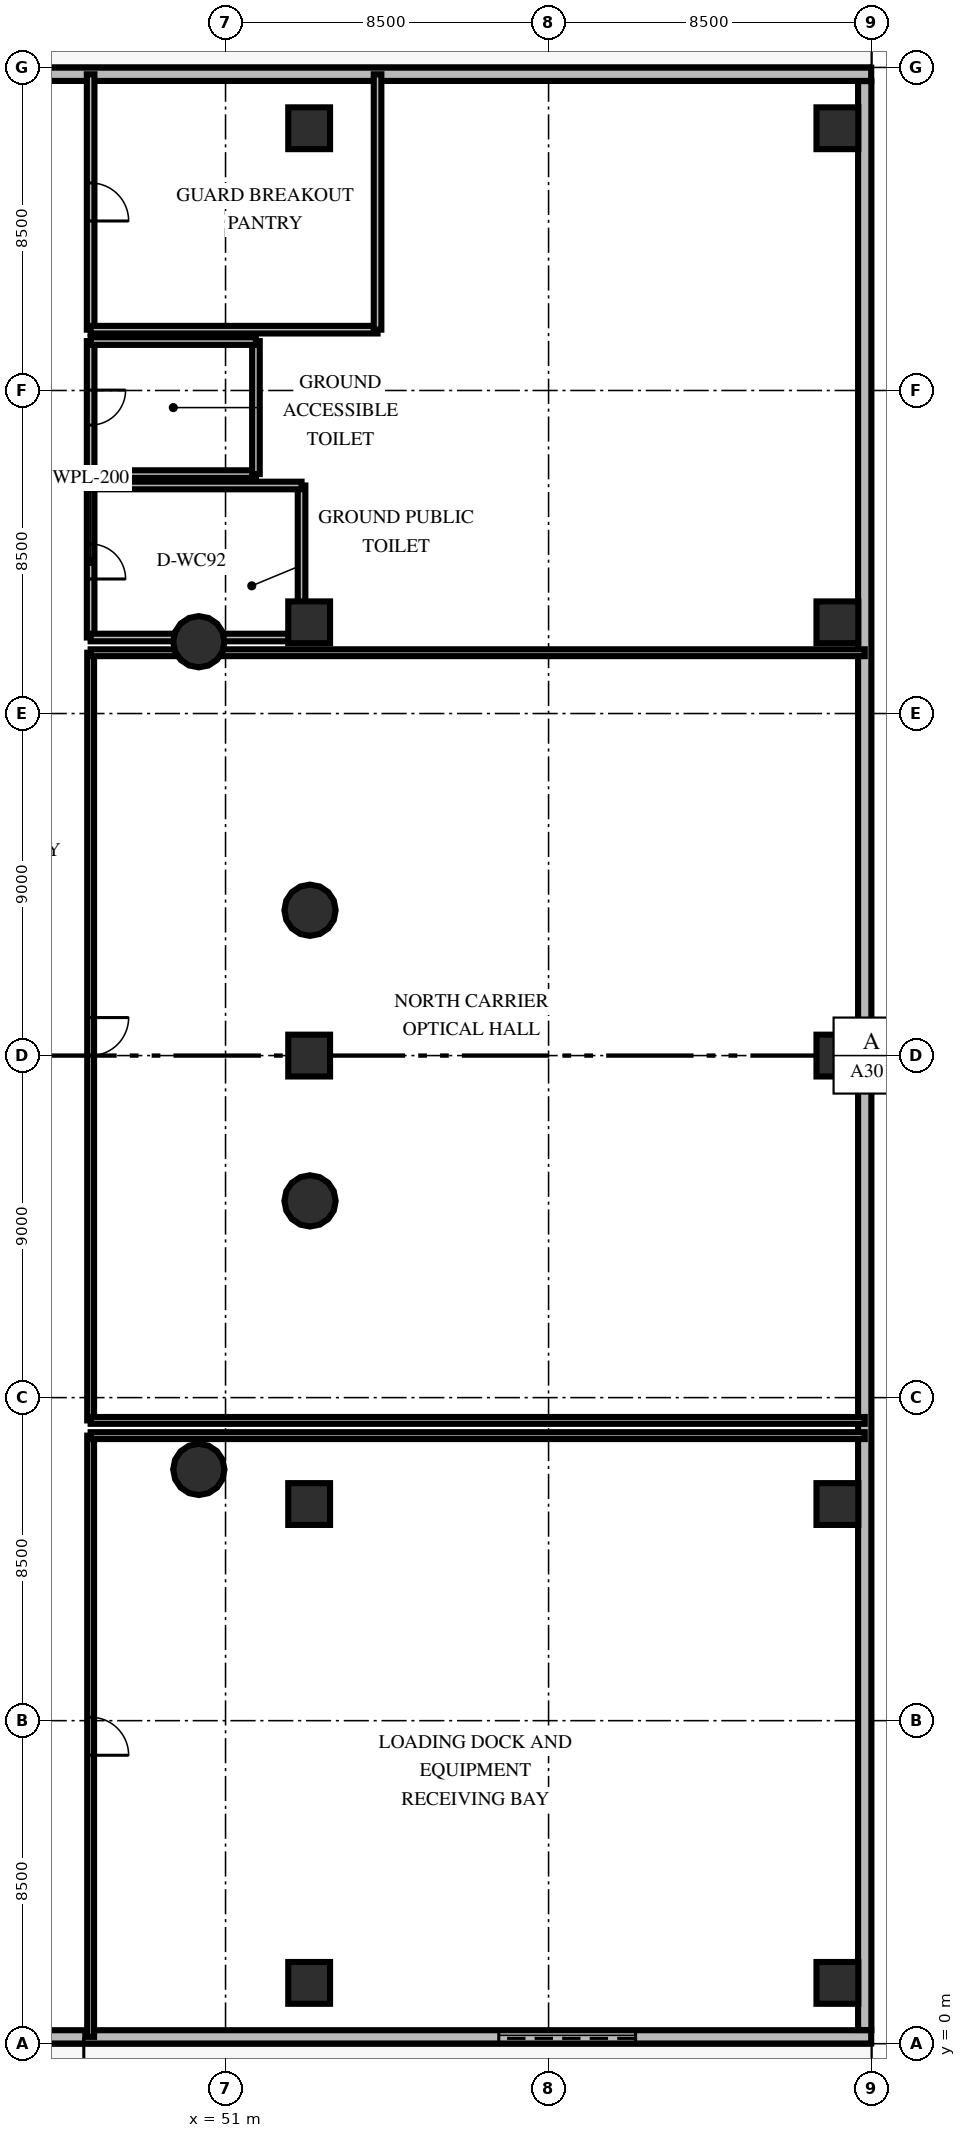
"""IFC4 building model, lengths in metres.
Left out: names, types, materials, properties, quantities, classifications, styles, units other than length and angle.
Written with IfcOpenShell. Run it as: python <this file> out.ifc"""

import sys

from ifc_helpers import new_model, si_unit, direction, frame, frame_2d, origin, origin_2d, place, context, subcontext, project, spatial, rectangle, circle, extrude, element, fill, save


model = new_model("IFC4")
c1 = context("Model", 3, precision=1e-05, world=origin(), true_north=direction((0.0, 1.0)))
c2 = subcontext(c1, "Body", "Model", "MODEL_VIEW")
j1 = project(units=[si_unit("LENGTHUNIT", "METRE"), si_unit("PLANEANGLEUNIT", "RADIAN")], contexts=[c1])
p1 = place(None, origin())
s1 = spatial("IfcSite", under=j1, at=p1, CompositionType="ELEMENT")
p2 = place(p1, origin())
s2 = spatial("IfcBuilding", under=s1, at=p2, CompositionType="ELEMENT")
p3 = place(p2, origin())
s3 = spatial("IfcBuildingStorey", under=s2, at=p3, CompositionType="ELEMENT", Elevation=0.0)
for number, where, z_axis, x_axis in (
    (1, (53.2, 1.6, 0.0), (0.0, 0.0, 1.0), (1.0, 0.0, 0.0)),
    (2, (53.2, 14.2, 0.0), (0.0, 0.0, 1.0), (1.0, 0.0, 0.0)),
    (3, (53.2, 26.0, 0.0), (0.0, 0.0, 1.0), (1.0, 0.0, 0.0)),
    (4, (53.2, 37.4, 0.0), (0.0, 0.0, 1.0), (1.0, 0.0, 0.0)),
    (5, (53.2, 50.4, 0.0), (0.0, 0.0, 1.0), (1.0, 0.0, 0.0)),
    (6, (67.1, 1.6, 0.0), (0.0, 0.0, 1.0), (1.0, 0.0, 0.0)),
    (7, (67.1, 14.2, 0.0), (0.0, 0.0, 1.0), (1.0, 0.0, 0.0)),
    (8, (67.1, 26.0, 0.0), (0.0, 0.0, 1.0), (1.0, 0.0, 0.0)),
    (9, (67.1, 37.4, 0.0), (0.0, 0.0, 1.0), (1.0, 0.0, 0.0)),
    (10, (67.1, 50.4, 0.0), (0.0, 0.0, 1.0), (1.0, 0.0, 0.0)),
):
    element("IfcColumn", number, at=place(p3, frame(where, z_axis=z_axis, x_axis=x_axis)), inside=s3, PredefinedType="COLUMN", context=c2, shape_type="SweptSolid", body=[
        extrude(rectangle(XDim=1.1, YDim=1.1, at=origin_2d()), origin(), (0.0, 0.0, 1.0), 5.4),
    ])
for number, where, z_axis, x_axis in (
    (11, (53.223, 29.824, 0.0), (0.0, 0.0, 1.0), (1.0, 0.0, 0.0)),
    (12, (50.297, 36.889, 0.0), (0.0, 0.0, 1.0), (1.0, 0.0, 0.0)),
    (13, (50.297, 15.111, 0.0), (0.0, 0.0, 1.0), (1.0, 0.0, 0.0)),
    (14, (53.223, 22.176, 0.0), (0.0, 0.0, 1.0), (1.0, 0.0, 0.0)),
):
    element("IfcColumn", number, at=place(p3, frame(where, z_axis=z_axis, x_axis=x_axis)), inside=s3, PredefinedType="COLUMN", context=c2, shape_type="SweptSolid", body=[
        extrude(circle(Radius=0.675, at=origin_2d()), origin(), (0.0, 0.0, 1.0), 5.4),
    ])
p4 = place(p3, frame((67.99, 0.18, 0.0), z_axis=(0.0, 0.0, 1.0), x_axis=(-1.0, 0.0, 0.0)))
e15 = element("IfcWall", 15, at=p4, inside=s3, PredefinedType="SOLIDWALL", context=c2, shape_type="SweptSolid", body=[
    extrude(rectangle(XDim=25.37, YDim=0.35, at=frame_2d((12.685, 0.0))), origin(), (0.0, 0.0, 1.0), 4.36),
])
p5 = place(p4, frame((20.72, 0.0, 0.0)))
e16 = element("IfcOpeningElement", 16, at=p5, cuts=e15, PredefinedType="OPENING", context=c2, shape_type="SweptSolid", body=[
    extrude(rectangle(XDim=2.1, YDim=2.35, at=frame_2d((1.05, 1.175))), frame((0.0, 0.185, 0.0), z_axis=(0.0, -1.0, 0.0), x_axis=(1.0, 0.0, 0.0)), (0.0, 0.0, 1.0), 0.37),
])
p6 = place(p4, frame((6.2, 0.0, 0.0)))
e17 = element("IfcOpeningElement", 17, at=p6, cuts=e15, PredefinedType="OPENING", context=c2, shape_type="SweptSolid", body=[
    extrude(rectangle(XDim=3.6, YDim=3.6, at=frame_2d((1.8, 1.8))), frame((0.0, 0.185, 0.0), z_axis=(0.0, -1.0, 0.0), x_axis=(1.0, 0.0, 0.0)), (0.0, 0.0, 1.0), 0.37),
])
p7 = place(p3, frame((67.82, 51.64, 0.0), z_axis=(0.0, 0.0, 1.0), x_axis=(0.0, -1.0, 0.0)))
e18 = element("IfcWall", 18, at=p7, inside=s3, PredefinedType="SOLIDWALL", context=c2, shape_type="SweptSolid", body=[
    extrude(rectangle(XDim=51.28, YDim=0.35, at=frame_2d((25.64, 0.0))), origin(), (0.0, 0.0, 1.0), 4.36),
])
p8 = place(p3, frame((42.62, 51.82, 0.0), z_axis=(0.0, 0.0, 1.0), x_axis=(1.0, 0.0, 0.0)))
e19 = element("IfcWall", 19, at=p8, inside=s3, PredefinedType="SOLIDWALL", context=c2, shape_type="SweptSolid", body=[
    extrude(rectangle(XDim=25.37, YDim=0.35, at=frame_2d((12.685, 0.0))), origin(), (0.0, 0.0, 1.0), 4.36),
])
p9 = place(p3, frame((47.45, 16.0, 0.0), z_axis=(0.0, 0.0, 1.0), x_axis=(0.0, -1.0, 0.0)))
e20 = element("IfcWall", 20, at=p9, inside=s3, PredefinedType="PARTITIONING", context=c2, shape_type="SweptSolid", body=[
    extrude(rectangle(XDim=15.82, YDim=0.18, at=frame_2d((7.91, 0.0))), origin(), (0.0, 0.0, 1.0), 4.16),
])
p10 = place(p9, frame((7.41, 0.0, 0.0)))
e21 = element("IfcOpeningElement", 21, at=p10, cuts=e20, PredefinedType="OPENING", context=c2, shape_type="SweptSolid", body=[
    extrude(rectangle(XDim=1.0, YDim=2.15, at=frame_2d((0.5, 1.075))), frame((0.0, 0.1, 0.0), z_axis=(0.0, -1.0, 0.0), x_axis=(1.0, 0.0, 0.0)), (0.0, 0.0, 1.0), 0.2),
])
p11 = place(p3, frame((67.82, 16.0, 0.0), z_axis=(0.0, 0.0, 1.0), x_axis=(-1.0, 0.0, 0.0)))
e22 = element("IfcWall", 22, at=p11, inside=s3, PredefinedType="PARTITIONING", context=c2, shape_type="SweptSolid", body=[
    extrude(rectangle(XDim=20.37, YDim=0.18, at=frame_2d((10.185, 0.0))), origin(), (0.0, 0.0, 1.0), 4.16),
])
p12 = place(p3, frame((47.45, 36.6, 0.0), z_axis=(0.0, 0.0, 1.0), x_axis=(0.0, -1.0, 0.0)))
e23 = element("IfcWall", 23, at=p12, inside=s3, PredefinedType="PARTITIONING", context=c2, shape_type="SweptSolid", body=[
    extrude(rectangle(XDim=20.2, YDim=0.18, at=frame_2d((10.1, 0.0))), origin(), (0.0, 0.0, 1.0), 4.16),
])
p13 = place(p12, frame((9.6, 0.0, 0.0)))
e24 = element("IfcOpeningElement", 24, at=p13, cuts=e23, PredefinedType="OPENING", context=c2, shape_type="SweptSolid", body=[
    extrude(rectangle(XDim=1.0, YDim=2.15, at=frame_2d((0.5, 1.075))), frame((0.0, 0.1, 0.0), z_axis=(0.0, -1.0, 0.0), x_axis=(1.0, 0.0, 0.0)), (0.0, 0.0, 1.0), 0.2),
])
for number, where, z_axis, x_axis in (
    (25, (47.45, 16.4, 0.0), (0.0, 0.0, 1.0), (1.0, 0.0, 0.0)),
    (26, (67.82, 36.6, 0.0), (0.0, 0.0, 1.0), (-1.0, 0.0, 0.0)),
):
    element("IfcWall", number, at=place(p3, frame(where, z_axis=z_axis, x_axis=x_axis)), inside=s3, PredefinedType="PARTITIONING", context=c2, shape_type="SweptSolid", body=[
        extrude(rectangle(XDim=20.37, YDim=0.18, at=frame_2d((10.185, 0.0))), origin(), (0.0, 0.0, 1.0), 4.16),
    ])
p14 = place(p3, frame((47.45, 41.0, 0.0), z_axis=(0.0, 0.0, 1.0), x_axis=(0.0, -1.0, 0.0)))
e27 = element("IfcWall", 27, at=p14, inside=s3, PredefinedType="PLUMBINGWALL", context=c2, shape_type="SweptSolid", body=[
    extrude(rectangle(XDim=4.0, YDim=0.2, at=frame_2d((2.0, 0.0))), origin(), (0.0, 0.0, 1.0), 4.16),
])
p15 = place(p14, frame((1.54, 0.0, 0.0)))
e28 = element("IfcOpeningElement", 28, at=p15, cuts=e27, PredefinedType="OPENING", context=c2, shape_type="SweptSolid", body=[
    extrude(rectangle(XDim=0.92, YDim=2.1, at=frame_2d((0.46, 1.05))), frame((0.0, 0.11, 0.0), z_axis=(0.0, -1.0, 0.0), x_axis=(1.0, 0.0, 0.0)), (0.0, 0.0, 1.0), 0.22),
])
p16 = place(p3, frame((47.45, 37.0, 0.0), z_axis=(0.0, 0.0, 1.0), x_axis=(1.0, 0.0, 0.0)))
e29 = element("IfcWall", 29, at=p16, inside=s3, PredefinedType="PLUMBINGWALL", context=c2, shape_type="SweptSolid", body=[
    extrude(rectangle(XDim=5.55, YDim=0.2, at=frame_2d((2.775, 0.0))), origin(), (0.0, 0.0, 1.0), 4.16),
])
p17 = place(p3, frame((53.0, 37.0, 0.0), z_axis=(0.0, 0.0, 1.0), x_axis=(0.0, 1.0, 0.0)))
e30 = element("IfcWall", 30, at=p17, inside=s3, PredefinedType="PLUMBINGWALL", context=c2, shape_type="SweptSolid", body=[
    extrude(rectangle(XDim=4.0, YDim=0.2, at=frame_2d((2.0, 0.0))), origin(), (0.0, 0.0, 1.0), 4.16),
])
p18 = place(p3, frame((53.0, 41.0, 0.0), z_axis=(0.0, 0.0, 1.0), x_axis=(-1.0, 0.0, 0.0)))
e31 = element("IfcWall", 31, at=p18, inside=s3, PredefinedType="PLUMBINGWALL", context=c2, shape_type="SweptSolid", body=[
    extrude(rectangle(XDim=5.55, YDim=0.2, at=frame_2d((2.775, 0.0))), origin(), (0.0, 0.0, 1.0), 4.16),
])
p19 = place(p3, frame((47.45, 44.8, 0.0), z_axis=(0.0, 0.0, 1.0), x_axis=(0.0, -1.0, 0.0)))
e32 = element("IfcWall", 32, at=p19, inside=s3, PredefinedType="PLUMBINGWALL", context=c2, shape_type="SweptSolid", body=[
    extrude(rectangle(XDim=3.5, YDim=0.2, at=frame_2d((1.75, 0.0))), origin(), (0.0, 0.0, 1.0), 4.16),
])
p20 = place(p19, frame((1.29, 0.0, 0.0)))
e33 = element("IfcOpeningElement", 33, at=p20, cuts=e32, PredefinedType="OPENING", context=c2, shape_type="SweptSolid", body=[
    extrude(rectangle(XDim=0.92, YDim=2.1, at=frame_2d((0.46, 1.05))), frame((0.0, 0.11, 0.0), z_axis=(0.0, -1.0, 0.0), x_axis=(1.0, 0.0, 0.0)), (0.0, 0.0, 1.0), 0.22),
])
p21 = place(p3, frame((47.45, 41.3, 0.0), z_axis=(0.0, 0.0, 1.0), x_axis=(1.0, 0.0, 0.0)))
e34 = element("IfcWall", 34, at=p21, inside=s3, PredefinedType="PLUMBINGWALL", context=c2, shape_type="SweptSolid", body=[
    extrude(rectangle(XDim=4.35, YDim=0.2, at=frame_2d((2.175, 0.0))), origin(), (0.0, 0.0, 1.0), 4.16),
])
p22 = place(p3, frame((51.8, 41.3, 0.0), z_axis=(0.0, 0.0, 1.0), x_axis=(0.0, 1.0, 0.0)))
e35 = element("IfcWall", 35, at=p22, inside=s3, PredefinedType="PLUMBINGWALL", context=c2, shape_type="SweptSolid", body=[
    extrude(rectangle(XDim=3.5, YDim=0.2, at=frame_2d((1.75, 0.0))), origin(), (0.0, 0.0, 1.0), 4.16),
])
p23 = place(p3, frame((51.8, 44.8, 0.0), z_axis=(0.0, 0.0, 1.0), x_axis=(-1.0, 0.0, 0.0)))
e36 = element("IfcWall", 36, at=p23, inside=s3, PredefinedType="PLUMBINGWALL", context=c2, shape_type="SweptSolid", body=[
    extrude(rectangle(XDim=4.35, YDim=0.2, at=frame_2d((2.175, 0.0))), origin(), (0.0, 0.0, 1.0), 4.16),
])
p24 = place(p3, frame((47.45, 51.82, 0.0), z_axis=(0.0, 0.0, 1.0), x_axis=(0.0, -1.0, 0.0)))
e37 = element("IfcWall", 37, at=p24, inside=s3, PredefinedType="PLUMBINGWALL", context=c2, shape_type="SweptSolid", body=[
    extrude(rectangle(XDim=6.72, YDim=0.2, at=frame_2d((3.36, 0.0))), origin(), (0.0, 0.0, 1.0), 4.16),
])
p25 = place(p24, frame((2.86, 0.0, 0.0)))
e38 = element("IfcOpeningElement", 38, at=p25, cuts=e37, PredefinedType="OPENING", context=c2, shape_type="SweptSolid", body=[
    extrude(rectangle(XDim=1.0, YDim=2.15, at=frame_2d((0.5, 1.075))), frame((0.0, 0.11, 0.0), z_axis=(0.0, -1.0, 0.0), x_axis=(1.0, 0.0, 0.0)), (0.0, 0.0, 1.0), 0.22),
])
p26 = place(p3, frame((47.45, 45.1, 0.0), z_axis=(0.0, 0.0, 1.0), x_axis=(1.0, 0.0, 0.0)))
e39 = element("IfcWall", 39, at=p26, inside=s3, PredefinedType="PLUMBINGWALL", context=c2, shape_type="SweptSolid", body=[
    extrude(rectangle(XDim=7.55, YDim=0.2, at=frame_2d((3.775, 0.0))), origin(), (0.0, 0.0, 1.0), 4.16),
])
p27 = place(p3, frame((55.0, 45.1, 0.0), z_axis=(0.0, 0.0, 1.0), x_axis=(0.0, 1.0, 0.0)))
e40 = element("IfcWall", 40, at=p27, inside=s3, PredefinedType="PLUMBINGWALL", context=c2, shape_type="SweptSolid", body=[
    extrude(rectangle(XDim=6.72, YDim=0.2, at=frame_2d((3.36, 0.0))), origin(), (0.0, 0.0, 1.0), 4.16),
])
p28 = place(p5, origin())
e41 = element("IfcDoor", 41, at=p28, inside=s3, OperationType="DOUBLE_DOOR_SINGLE_SWING", PredefinedType="DOOR", context=c2, shape_type="SweptSolid", body=[
    extrude(rectangle(XDim=2.1, YDim=2.35, at=frame_2d((1.05, 1.175))), frame((0.0, 0.025, 0.0), z_axis=(0.0, -1.0, 0.0), x_axis=(1.0, 0.0, 0.0)), (0.0, 0.0, 1.0), 0.05),
])
fill(e16, e41)
p29 = place(p6, origin())
e42 = element("IfcDoor", 42, at=p29, inside=s3, OperationType="ROLLINGUP", PredefinedType="DOOR", context=c2, shape_type="SweptSolid", body=[
    extrude(rectangle(XDim=3.6, YDim=3.6, at=frame_2d((1.8, 1.8))), frame((0.0, 0.025, 0.0), z_axis=(0.0, -1.0, 0.0), x_axis=(1.0, 0.0, 0.0)), (0.0, 0.0, 1.0), 0.05),
])
fill(e17, e42)
p30 = place(p10, origin())
e43 = element("IfcDoor", 43, at=p30, inside=s3, OperationType="SINGLE_SWING_RIGHT", PredefinedType="DOOR", context=c2, shape_type="SweptSolid", body=[
    extrude(rectangle(XDim=1.0, YDim=2.15, at=frame_2d((0.5, 1.075))), frame((0.0, 0.025, 0.0), z_axis=(0.0, -1.0, 0.0), x_axis=(1.0, 0.0, 0.0)), (0.0, 0.0, 1.0), 0.05),
])
fill(e21, e43)
p31 = place(p13, origin())
e44 = element("IfcDoor", 44, at=p31, inside=s3, OperationType="SINGLE_SWING_LEFT", PredefinedType="DOOR", context=c2, shape_type="SweptSolid", body=[
    extrude(rectangle(XDim=1.0, YDim=2.15, at=frame_2d((0.5, 1.075))), frame((0.0, 0.025, 0.0), z_axis=(0.0, -1.0, 0.0), x_axis=(1.0, 0.0, 0.0)), (0.0, 0.0, 1.0), 0.05),
])
fill(e24, e44)
p32 = place(p15, origin())
e45 = element("IfcDoor", 45, at=p32, inside=s3, OperationType="SINGLE_SWING_RIGHT", PredefinedType="DOOR", context=c2, shape_type="SweptSolid", body=[
    extrude(rectangle(XDim=0.92, YDim=2.1, at=frame_2d((0.46, 1.05))), frame((0.0, 0.025, 0.0), z_axis=(0.0, -1.0, 0.0), x_axis=(1.0, 0.0, 0.0)), (0.0, 0.0, 1.0), 0.05),
])
fill(e28, e45)
p33 = place(p20, origin())
e46 = element("IfcDoor", 46, at=p33, inside=s3, OperationType="SINGLE_SWING_LEFT", PredefinedType="DOOR", context=c2, shape_type="SweptSolid", body=[
    extrude(rectangle(XDim=0.92, YDim=2.1, at=frame_2d((0.46, 1.05))), frame((0.0, 0.025, 0.0), z_axis=(0.0, -1.0, 0.0), x_axis=(1.0, 0.0, 0.0)), (0.0, 0.0, 1.0), 0.05),
])
fill(e33, e46)
p34 = place(p25, origin())
e47 = element("IfcDoor", 47, at=p34, inside=s3, OperationType="SINGLE_SWING_RIGHT", PredefinedType="DOOR", context=c2, shape_type="SweptSolid", body=[
    extrude(rectangle(XDim=1.0, YDim=2.15, at=frame_2d((0.5, 1.075))), frame((0.0, 0.025, 0.0), z_axis=(0.0, -1.0, 0.0), x_axis=(1.0, 0.0, 0.0)), (0.0, 0.0, 1.0), 0.05),
])
fill(e38, e47)
save(model, sys.argv[1])
